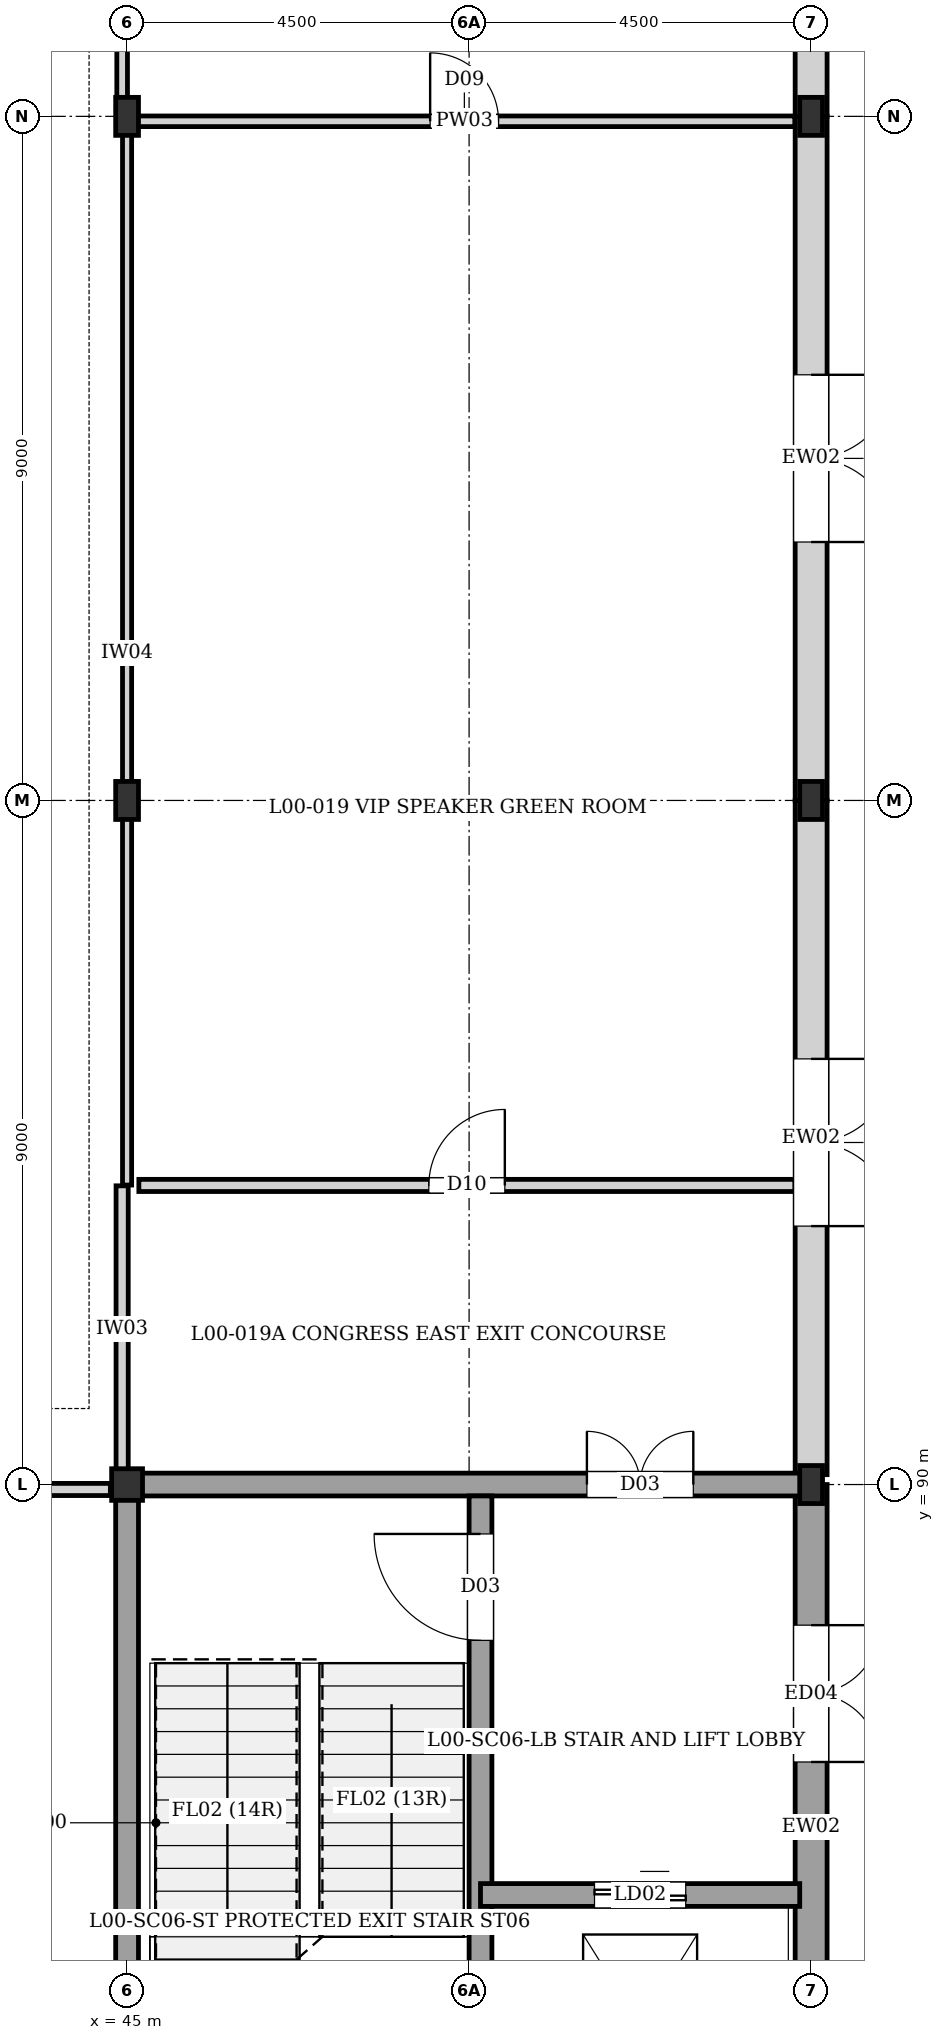
"""IFC4 building model, lengths in metres.
Left out: names, types, materials, properties, quantities, classifications, styles, units other than length and angle.
Written with IfcOpenShell. Run it as: python <this file> out.ifc"""

import sys

from ifc_helpers import new_model, si_unit, direction, frame, frame_2d, origin, origin_2d, place, context, subcontext, project, spatial, rectangle, i_section, extrude, element, fill, save


model = new_model("IFC4")
c1 = context("Model", 3, precision=1e-05, world=origin(), true_north=direction((0.0, 1.0)))
c2 = subcontext(c1, "Body", "Model", "MODEL_VIEW")
j1 = project(units=[si_unit("LENGTHUNIT", "METRE"), si_unit("PLANEANGLEUNIT", "RADIAN")], contexts=[c1])
p1 = place(None, origin())
s1 = spatial("IfcSite", under=j1, at=p1, CompositionType="ELEMENT")
p2 = place(p1, origin())
s2 = spatial("IfcBuilding", under=s1, at=p2, CompositionType="ELEMENT")
p3 = place(p2, origin())
s3 = spatial("IfcBuildingStorey", under=s2, at=p3, CompositionType="ELEMENT", Elevation=0.0)
p4 = place(p3, frame((45.0, 90.0, 0.0), z_axis=(0.0, 0.0, 1.0), x_axis=(1.0, 0.0, 0.0)))
e1 = element("IfcColumn", 1, at=p4, inside=s3, PredefinedType="COLUMN", context=c2, shape_type="SweptSolid", body=[
    extrude(i_section(OverallWidth=0.406, OverallDepth=0.416, WebThickness=0.022, FlangeThickness=0.038, at=origin_2d()), origin(), (0.0, 0.0, 1.0), 4.32),
])
for number, where, z_axis, x_axis in (
    (2, (45.0, 99.0, 0.0), (0.0, 0.0, 1.0), (1.0, 0.0, 0.0)),
    (3, (45.0, 108.0, 0.0), (0.0, 0.0, 1.0), (1.0, 0.0, 0.0)),
    (4, (54.0, 90.0, 0.0), (0.0, 0.0, 1.0), (1.0, 0.0, 0.0)),
    (5, (54.0, 99.0, 0.0), (0.0, 0.0, 1.0), (1.0, 0.0, 0.0)),
    (6, (54.0, 108.0, 0.0), (0.0, 0.0, 1.0), (1.0, 0.0, 0.0)),
):
    element("IfcColumn", number, at=place(p3, frame(where, z_axis=z_axis, x_axis=x_axis)), inside=s3, PredefinedType="COLUMN", context=c2, shape_type="SweptSolid", body=[
        extrude(i_section(OverallWidth=0.3, OverallDepth=0.5, WebThickness=0.014, FlangeThickness=0.028, at=origin_2d()), origin(), (0.0, 0.0, 1.0), 4.32),
    ])
p5 = place(p3, frame((54.0, 113.845, 0.0), z_axis=(0.0, 0.0, 1.0), x_axis=(0.0, -1.0, 0.0)))
e7 = element("IfcWall", 7, at=p5, inside=s3, PredefinedType="SOLIDWALL", context=c2, shape_type="SweptSolid", body=[
    extrude(rectangle(XDim=5.845, YDim=0.42, at=frame_2d((2.922, 0.0))), origin(), (0.0, 0.0, 1.0), 3.655),
])
p6 = place(p5, frame((1.495, 0.0, 0.4)))
e8 = element("IfcOpeningElement", 8, at=p6, cuts=e7, PredefinedType="OPENING", context=c2, shape_type="SweptSolid", body=[
    extrude(rectangle(XDim=2.7, YDim=1.95, at=frame_2d((1.35, 0.975))), frame((0.0, 0.22, 0.0), z_axis=(0.0, -1.0, 0.0), x_axis=(1.0, 0.0, 0.0)), (0.0, 0.0, 1.0), 0.44),
])
p7 = place(p3, frame((54.0, 108.0, 0.0), z_axis=(0.0, 0.0, 1.0), x_axis=(0.0, -1.0, 0.0)))
e9 = element("IfcWall", 9, at=p7, inside=s3, PredefinedType="SOLIDWALL", context=c2, shape_type="SweptSolid", body=[
    extrude(rectangle(XDim=9.0, YDim=0.42, at=frame_2d((4.5, 0.0))), origin(), (0.0, 0.0, 1.0), 3.695),
])
p8 = place(p7, frame((3.4, 0.0, 0.0)))
e10 = element("IfcOpeningElement", 10, at=p8, cuts=e9, PredefinedType="OPENING", context=c2, shape_type="SweptSolid", body=[
    extrude(rectangle(XDim=2.2, YDim=2.5, at=frame_2d((1.1, 1.25))), frame((0.0, 0.22, 0.0), z_axis=(0.0, -1.0, 0.0), x_axis=(1.0, 0.0, 0.0)), (0.0, 0.0, 1.0), 0.44),
])
p9 = place(p3, frame((54.0, 99.0, 0.0), z_axis=(0.0, 0.0, 1.0), x_axis=(0.0, -1.0, 0.0)))
e11 = element("IfcWall", 11, at=p9, inside=s3, PredefinedType="SOLIDWALL", context=c2, shape_type="SweptSolid", body=[
    extrude(rectangle(XDim=8.87, YDim=0.42, at=frame_2d((4.435, 0.0))), origin(), (0.0, 0.0, 1.0), 3.755),
])
p10 = place(p9, frame((3.4, 0.0, 0.0)))
e12 = element("IfcOpeningElement", 12, at=p10, cuts=e11, PredefinedType="OPENING", context=c2, shape_type="SweptSolid", body=[
    extrude(rectangle(XDim=2.2, YDim=2.5, at=frame_2d((1.1, 1.25))), frame((0.0, 0.22, 0.0), z_axis=(0.0, -1.0, 0.0), x_axis=(1.0, 0.0, 0.0)), (0.0, 0.0, 1.0), 0.44),
])
p11 = place(p3, frame((54.0, 90.0, 0.0), z_axis=(0.0, 0.0, 1.0), x_axis=(0.0, -1.0, 0.0)))
e13 = element("IfcWall", 13, at=p11, inside=s3, PredefinedType="SOLIDWALL", context=c2, shape_type="SweptSolid", body=[
    extrude(rectangle(XDim=9.0, YDim=0.42, at=frame_2d((4.5, 0.0))), origin(), (0.0, 0.0, 1.0), 4.055),
])
p12 = place(p11, frame((1.85, 0.0, 0.0)))
e14 = element("IfcOpeningElement", 14, at=p12, cuts=e13, PredefinedType="OPENING", context=c2, shape_type="SweptSolid", body=[
    extrude(rectangle(XDim=1.8, YDim=2.2, at=frame_2d((0.9, 1.1))), frame((0.0, 0.22, 0.0), z_axis=(0.0, -1.0, 0.0), x_axis=(1.0, 0.0, 0.0)), (0.0, 0.0, 1.0), 0.44),
])
p13 = place(p3, frame((45.0, 90.0, 0.0), z_axis=(0.0, 0.0, 1.0), x_axis=(1.0, 0.0, 0.0)))
e15 = element("IfcWall", 15, at=p13, inside=s3, PredefinedType="SHEAR", context=c2, shape_type="SweptSolid", body=[
    extrude(rectangle(XDim=9.0, YDim=0.3, at=frame_2d((4.5, 0.0))), origin(), (0.0, 0.0, 1.0), 4.055),
])
p14 = place(p13, frame((6.05, 0.0, 0.0)))
e16 = element("IfcOpeningElement", 16, at=p14, cuts=e15, PredefinedType="OPENING", context=c2, shape_type="SweptSolid", body=[
    extrude(rectangle(XDim=1.4, YDim=2.02, at=frame_2d((0.7, 1.01))), frame((0.0, 0.16, 0.0), z_axis=(0.0, -1.0, 0.0), x_axis=(1.0, 0.0, 0.0)), (0.0, 0.0, 1.0), 0.32),
])
p15 = place(p3, frame((45.0, 81.0, 0.0), z_axis=(0.0, 0.0, 1.0), x_axis=(0.0, 1.0, 0.0)))
e17 = element("IfcWall", 17, at=p15, inside=s3, PredefinedType="SHEAR", context=c2, shape_type="SweptSolid", body=[
    extrude(rectangle(XDim=9.0, YDim=0.3, at=frame_2d((4.5, 0.0))), origin(), (0.0, 0.0, 1.0), 4.055),
])
p16 = place(p3, frame((49.65, 81.15, 0.0), z_axis=(0.0, 0.0, 1.0), x_axis=(0.0, 1.0, 0.0)))
e18 = element("IfcWall", 18, at=p16, inside=s3, PredefinedType="SHEAR", context=c2, shape_type="SweptSolid", body=[
    extrude(rectangle(XDim=8.7, YDim=0.3, at=frame_2d((4.35, 0.0))), origin(), (0.0, 0.0, 1.0), 4.055),
])
p17 = place(p16, frame((6.8, 0.0, 0.0)))
e19 = element("IfcOpeningElement", 19, at=p17, cuts=e18, PredefinedType="OPENING", context=c2, shape_type="SweptSolid", body=[
    extrude(rectangle(XDim=1.4, YDim=2.02, at=frame_2d((0.7, 1.01))), frame((0.0, 0.16, 0.0), z_axis=(0.0, -1.0, 0.0), x_axis=(1.0, 0.0, 0.0)), (0.0, 0.0, 1.0), 0.32),
])
p18 = place(p3, frame((49.65, 84.6, 0.0), z_axis=(0.0, 0.0, 1.0), x_axis=(1.0, 0.0, 0.0)))
e20 = element("IfcWall", 20, at=p18, inside=s3, PredefinedType="SHEAR", context=c2, shape_type="SweptSolid", body=[
    extrude(rectangle(XDim=4.2, YDim=0.3, at=frame_2d((2.1, 0.0))), origin(), (0.0, 0.0, 1.0), 4.055),
])
p19 = place(p18, frame((1.5, 0.0, 0.0)))
e21 = element("IfcOpeningElement", 21, at=p19, cuts=e20, PredefinedType="OPENING", context=c2, shape_type="SweptSolid", body=[
    extrude(rectangle(XDim=1.2, YDim=2.2, at=frame_2d((0.6, 1.1))), frame((0.0, 0.16, 0.0), z_axis=(0.0, -1.0, 0.0), x_axis=(1.0, 0.0, 0.0)), (0.0, 0.0, 1.0), 0.32),
])
p20 = place(p3, frame((44.935, 90.155, 0.0), z_axis=(0.0, 0.0, 1.0), x_axis=(0.0, 1.0, 0.0)))
e22 = element("IfcWall", 22, at=p20, inside=s3, PredefinedType="PARTITIONING", context=c2, shape_type="SweptSolid", body=[
    extrude(rectangle(XDim=3.775, YDim=0.16, at=frame_2d((1.887, 0.0))), origin(), (0.0, 0.0, 1.0), 4.055),
])
p21 = place(p3, frame((45.0, 93.94, 0.0), z_axis=(0.0, 0.0, 1.0), x_axis=(0.0, 1.0, 0.0)))
e23 = element("IfcWall", 23, at=p21, inside=s3, PredefinedType="PARTITIONING", context=c2, shape_type="SweptSolid", body=[
    extrude(rectangle(XDim=13.99, YDim=0.12, at=frame_2d((6.995, 0.0))), origin(), (0.0, 0.0, 1.0), 4.055),
])
p22 = place(p3, frame((44.935, 107.94, 0.0), z_axis=(0.0, 0.0, 1.0), x_axis=(0.0, 1.0, 0.0)))
e24 = element("IfcWall", 24, at=p22, inside=s3, PredefinedType="PLUMBINGWALL", context=c2, shape_type="SweptSolid", body=[
    extrude(rectangle(XDim=5.845, YDim=0.14, at=frame_2d((2.922, 0.0))), origin(), (0.0, 0.0, 1.0), 4.055),
])
p23 = place(p3, frame((37.09, 89.935, 0.0), z_axis=(0.0, 0.0, 1.0), x_axis=(1.0, 0.0, 0.0)))
e25 = element("IfcWall", 25, at=p23, inside=s3, PredefinedType="PARTITIONING", context=c2, shape_type="SweptSolid", body=[
    extrude(rectangle(XDim=7.69, YDim=0.16, at=frame_2d((3.845, 0.0))), origin(), (0.0, 0.0, 1.0), 3.505),
])
p24 = place(p23, frame((2.845, 0.0, 0.0)))
e26 = element("IfcOpeningElement", 26, at=p24, cuts=e25, PredefinedType="OPENING", context=c2, shape_type="SweptSolid", body=[
    extrude(rectangle(XDim=2.0, YDim=2.35, at=frame_2d((1.0, 1.175))), frame((0.0, 0.09, 0.0), z_axis=(0.0, -1.0, 0.0), x_axis=(1.0, 0.0, 0.0)), (0.0, 0.0, 1.0), 0.18),
])
p25 = place(p3, frame((45.155, 93.935, 0.0), z_axis=(0.0, 0.0, 1.0), x_axis=(1.0, 0.0, 0.0)))
e27 = element("IfcWall", 27, at=p25, inside=s3, PredefinedType="PARTITIONING", context=c2, shape_type="SweptSolid", body=[
    extrude(rectangle(XDim=8.63, YDim=0.16, at=frame_2d((4.315, 0.0))), origin(), (0.0, 0.0, 1.0), 4.055),
])
p26 = place(p25, frame((3.815, 0.0, 0.0)))
e28 = element("IfcOpeningElement", 28, at=p26, cuts=e27, PredefinedType="OPENING", context=c2, shape_type="SweptSolid", body=[
    extrude(rectangle(XDim=1.0, YDim=2.1, at=frame_2d((0.5, 1.05))), frame((0.0, 0.09, 0.0), z_axis=(0.0, -1.0, 0.0), x_axis=(1.0, 0.0, 0.0)), (0.0, 0.0, 1.0), 0.18),
])
p27 = place(p3, frame((45.09, 107.935, 0.0), z_axis=(0.0, 0.0, 1.0), x_axis=(1.0, 0.0, 0.0)))
e29 = element("IfcWall", 29, at=p27, inside=s3, PredefinedType="PLUMBINGWALL", context=c2, shape_type="SweptSolid", body=[
    extrude(rectangle(XDim=8.695, YDim=0.14, at=frame_2d((4.347, 0.0))), origin(), (0.0, 0.0, 1.0), 4.055),
])
p28 = place(p27, frame((3.897, 0.0, 0.0)))
e30 = element("IfcOpeningElement", 30, at=p28, cuts=e29, PredefinedType="OPENING", context=c2, shape_type="SweptSolid", body=[
    extrude(rectangle(XDim=0.9, YDim=2.1, at=frame_2d((0.45, 1.05))), frame((0.0, 0.08, 0.0), z_axis=(0.0, -1.0, 0.0), x_axis=(1.0, 0.0, 0.0)), (0.0, 0.0, 1.0), 0.16),
])
p29 = place(p8, origin())
e31 = element("IfcDoor", 31, at=p29, inside=s3, OperationType="DOUBLE_DOOR_SINGLE_SWING", PredefinedType="DOOR", context=c2, shape_type="SweptSolid", body=[
    extrude(rectangle(XDim=2.2, YDim=2.5, at=frame_2d((1.1, 1.25))), frame((0.0, 0.025, 0.0), z_axis=(0.0, -1.0, 0.0), x_axis=(1.0, 0.0, 0.0)), (0.0, 0.0, 1.0), 0.05),
])
fill(e10, e31)
p30 = place(p10, origin())
e32 = element("IfcDoor", 32, at=p30, inside=s3, OperationType="DOUBLE_DOOR_SINGLE_SWING", PredefinedType="DOOR", context=c2, shape_type="SweptSolid", body=[
    extrude(rectangle(XDim=2.2, YDim=2.5, at=frame_2d((1.1, 1.25))), frame((0.0, 0.025, 0.0), z_axis=(0.0, -1.0, 0.0), x_axis=(1.0, 0.0, 0.0)), (0.0, 0.0, 1.0), 0.05),
])
fill(e12, e32)
p31 = place(p12, origin())
e33 = element("IfcDoor", 33, at=p31, inside=s3, OperationType="DOUBLE_DOOR_SINGLE_SWING", PredefinedType="DOOR", context=c2, shape_type="SweptSolid", body=[
    extrude(rectangle(XDim=1.8, YDim=2.2, at=frame_2d((0.9, 1.1))), frame((0.0, 0.025, 0.0), z_axis=(0.0, -1.0, 0.0), x_axis=(1.0, 0.0, 0.0)), (0.0, 0.0, 1.0), 0.05),
])
fill(e14, e33)
p32 = place(p14, origin())
e34 = element("IfcDoor", 34, at=p32, inside=s3, OperationType="DOUBLE_DOOR_SINGLE_SWING", PredefinedType="DOOR", context=c2, shape_type="SweptSolid", body=[
    extrude(rectangle(XDim=1.4, YDim=2.02, at=frame_2d((0.7, 1.01))), frame((0.0, 0.025, 0.0), z_axis=(0.0, -1.0, 0.0), x_axis=(1.0, 0.0, 0.0)), (0.0, 0.0, 1.0), 0.05),
])
fill(e16, e34)
p33 = place(p17, origin())
e35 = element("IfcDoor", 35, at=p33, inside=s3, OperationType="SINGLE_SWING_RIGHT", PredefinedType="DOOR", context=c2, shape_type="SweptSolid", body=[
    extrude(rectangle(XDim=1.4, YDim=2.02, at=frame_2d((0.7, 1.01))), frame((0.0, 0.025, 0.0), z_axis=(0.0, -1.0, 0.0), x_axis=(1.0, 0.0, 0.0)), (0.0, 0.0, 1.0), 0.05),
])
fill(e19, e35)
p34 = place(p19, origin())
e36 = element("IfcDoor", 36, at=p34, inside=s3, OperationType="DOUBLE_DOOR_SLIDING", PredefinedType="DOOR", context=c2, shape_type="SweptSolid", body=[
    extrude(rectangle(XDim=1.2, YDim=2.2, at=frame_2d((0.6, 1.1))), frame((0.0, 0.025, 0.0), z_axis=(0.0, -1.0, 0.0), x_axis=(1.0, 0.0, 0.0)), (0.0, 0.0, 1.0), 0.05),
])
fill(e21, e36)
p35 = place(p26, origin())
e37 = element("IfcDoor", 37, at=p35, inside=s3, OperationType="SINGLE_SWING_RIGHT", PredefinedType="DOOR", context=c2, shape_type="SweptSolid", body=[
    extrude(rectangle(XDim=1.0, YDim=2.1, at=frame_2d((0.5, 1.05))), frame((0.0, 0.025, 0.0), z_axis=(0.0, -1.0, 0.0), x_axis=(1.0, 0.0, 0.0)), (0.0, 0.0, 1.0), 0.05),
])
fill(e28, e37)
p36 = place(p28, origin())
e38 = element("IfcDoor", 38, at=p36, inside=s3, OperationType="SINGLE_SWING_LEFT", PredefinedType="DOOR", context=c2, shape_type="SweptSolid", body=[
    extrude(rectangle(XDim=0.9, YDim=2.1, at=frame_2d((0.45, 1.05))), frame((0.0, 0.025, 0.0), z_axis=(0.0, -1.0, 0.0), x_axis=(1.0, 0.0, 0.0)), (0.0, 0.0, 1.0), 0.05),
])
fill(e30, e38)
save(model, sys.argv[1])
